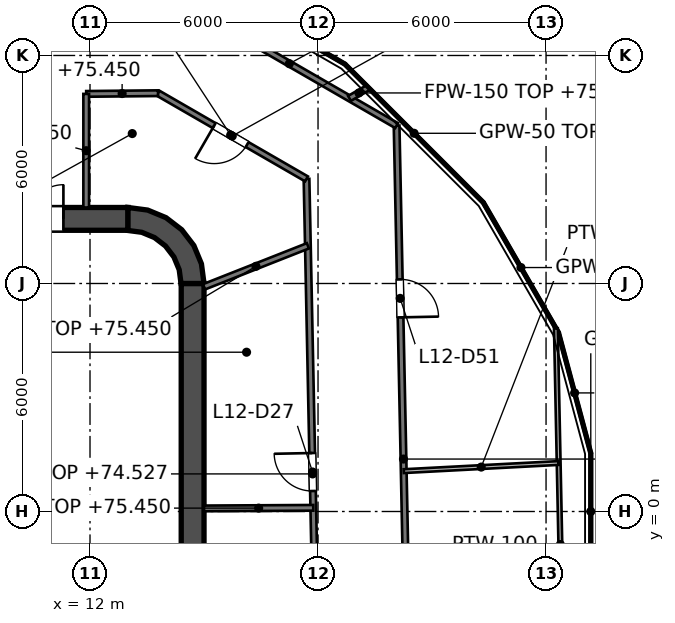
"""IFC4 building model, lengths in metres.
Left out: names, types, materials, properties, quantities, classifications, styles, units other than length and angle.
Written with IfcOpenShell. Run it as: python <this file> out.ifc"""

import sys

from ifc_helpers import new_model, si_unit, direction, frame, frame_2d, origin, place, context, subcontext, project, spatial, polyline, rectangle, outline, extrude, element, fill, save


model = new_model("IFC4")
c1 = context("Model", 3, precision=1e-05, world=origin(), true_north=direction((0.0, 1.0)))
c2 = subcontext(c1, "Body", "Model", "MODEL_VIEW")
j1 = project(units=[si_unit("LENGTHUNIT", "METRE"), si_unit("PLANEANGLEUNIT", "RADIAN")], contexts=[c1])
p1 = place(None, origin())
s1 = spatial("IfcSite", under=j1, at=p1, CompositionType="ELEMENT")
p2 = place(p1, origin())
s2 = spatial("IfcBuilding", under=s1, at=p2, CompositionType="ELEMENT")
p3 = place(p2, frame((0.0, 0.0, 71.4)))
s3 = spatial("IfcBuildingStorey", under=s2, at=p3, CompositionType="ELEMENT", Elevation=71.4)
p4 = place(p3, frame((-13.0, 7.7, 0.0), z_axis=(0.0, 0.0, 1.0), x_axis=(1.0, 0.0, 0.0)))
e1 = element("IfcWall", 1, at=p4, inside=s3, PredefinedType="SHEAR", context=c2, shape_type="SweptSolid", body=[
    extrude(rectangle(XDim=26.0, YDim=0.6, at=frame_2d((13.0, 0.0))), origin(), (0.0, 0.0, 1.0), 4.2),
])
p5 = place(p4, frame((1.7, 0.0, 0.0)))
e2 = element("IfcOpeningElement", 2, at=p5, cuts=e1, PredefinedType="OPENING", context=c2, shape_type="SweptSolid", body=[
    extrude(rectangle(XDim=1.8, YDim=2.1, at=frame_2d((0.9, 1.05))), frame((0.0, 0.3, 0.0), z_axis=(0.0, -1.0, 0.0), x_axis=(1.0, 0.0, 0.0)), (0.0, 0.0, 1.0), 0.6),
])
p6 = place(p4, frame((22.5, 0.0, 0.0)))
e3 = element("IfcOpeningElement", 3, at=p6, cuts=e1, PredefinedType="OPENING", context=c2, shape_type="SweptSolid", body=[
    extrude(rectangle(XDim=1.8, YDim=2.1, at=frame_2d((0.9, 1.05))), frame((0.0, 0.3, 0.0), z_axis=(0.0, -1.0, 0.0), x_axis=(1.0, 0.0, 0.0)), (0.0, 0.0, 1.0), 0.6),
])
p7 = place(p3, frame((14.7, -6.0, 0.0), z_axis=(0.0, 0.0, 1.0), x_axis=(0.0, 1.0, 0.0)))
e4 = element("IfcWall", 4, at=p7, inside=s3, PredefinedType="SHEAR", context=c2, shape_type="SweptSolid", body=[
    extrude(rectangle(XDim=12.0, YDim=0.6, at=frame_2d((6.0, 0.0))), origin(), (0.0, 0.0, 1.0), 4.2),
])
p8 = place(p3, origin())
e5 = element("IfcWall", 5, at=p8, inside=s3, PredefinedType="SHEAR", context=c2, shape_type="SweptSolid", body=[
    extrude(outline(polyline([(13.0, 8.0), (13.0, 7.395), (13.361, 7.347), (13.698, 7.208), (13.986, 6.986), (14.208, 6.698), (14.347, 6.361), (14.395, 6.0), (15.0, 6.0), (14.932, 6.518), (14.732, 7.0), (14.414, 7.414), (14.0, 7.732), (13.518, 7.932), (13.0, 8.0)])), origin(), (0.0, 0.0, 1.0), 4.2),
])
p9 = place(p3, frame((11.8, -7.4, 0.0), z_axis=(0.0, 0.0, 1.0), x_axis=(0.0, 1.0, 0.0)))
e6 = element("IfcWall", 6, at=p9, inside=s3, PredefinedType="SOLIDWALL", context=c2, shape_type="SweptSolid", body=[
    extrude(rectangle(XDim=14.8, YDim=0.4, at=frame_2d((7.4, 0.0))), origin(), (0.0, 0.0, 1.0), 4.05),
])
p10 = place(p9, frame((11.2, 0.0, 0.0)))
e7 = element("IfcOpeningElement", 7, at=p10, cuts=e6, PredefinedType="OPENING", context=c2, shape_type="SweptSolid", body=[
    extrude(rectangle(XDim=1.1, YDim=2.1, at=frame_2d((0.55, 1.05))), frame((0.0, 0.2, 0.0), z_axis=(0.0, -1.0, 0.0), x_axis=(1.0, 0.0, 0.0)), (0.0, 0.0, 1.0), 0.4),
])
p11 = place(p9, frame((8.3, 0.0, 0.0)))
e8 = element("IfcOpeningElement", 8, at=p11, cuts=e6, PredefinedType="OPENING", context=c2, shape_type="SweptSolid", body=[
    extrude(rectangle(XDim=1.1, YDim=2.1, at=frame_2d((0.55, 1.05))), frame((0.0, 0.2, 0.0), z_axis=(0.0, -1.0, 0.0), x_axis=(1.0, 0.0, 0.0)), (0.0, 0.0, 1.0), 0.4),
])
p12 = place(p9, frame((5.4, 0.0, 0.0)))
e9 = element("IfcOpeningElement", 9, at=p12, cuts=e6, PredefinedType="OPENING", context=c2, shape_type="SweptSolid", body=[
    extrude(rectangle(XDim=1.1, YDim=2.1, at=frame_2d((0.55, 1.05))), frame((0.0, 0.2, 0.0), z_axis=(0.0, -1.0, 0.0), x_axis=(1.0, 0.0, 0.0)), (0.0, 0.0, 1.0), 0.4),
])
p13 = place(p9, frame((13.552, 0.0, 0.0)))
e10 = element("IfcOpeningElement", 10, at=p13, cuts=e6, PredefinedType="OPENING", context=c2, shape_type="SweptSolid", body=[
    extrude(rectangle(XDim=0.9, YDim=2.1, at=frame_2d((0.45, 1.05))), frame((0.0, 0.2, 0.0), z_axis=(0.0, -1.0, 0.0), x_axis=(1.0, 0.0, 0.0)), (0.0, 0.0, 1.0), 0.4),
])
p14 = place(p9, frame((0.347, 0.0, 0.0)))
e11 = element("IfcOpeningElement", 11, at=p14, cuts=e6, PredefinedType="OPENING", context=c2, shape_type="SweptSolid", body=[
    extrude(rectangle(XDim=0.9, YDim=2.1, at=frame_2d((0.45, 1.05))), frame((0.0, 0.2, 0.0), z_axis=(0.0, -1.0, 0.0), x_axis=(1.0, 0.0, 0.0)), (0.0, 0.0, 1.0), 0.4),
])
e12 = element("IfcWall", 12, at=p8, inside=s3, PredefinedType="SOLIDWALL", context=c2, shape_type="SweptSolid", body=[
    extrude(outline(polyline([(12.0, -5.675), (12.0, -5.925), (14.15, -5.925), (14.4, -5.925), (14.4, -5.675), (14.4, -3.025), (14.4, -2.775), (14.4, -0.125), (14.4, 0.125), (14.4, 2.775), (14.4, 3.025), (14.4, 5.675), (14.4, 5.925), (14.15, 5.925), (12.0, 5.925), (12.0, 5.675), (14.15, 5.675), (14.15, 3.025), (12.0, 3.025), (12.0, 2.775), (14.15, 2.775), (14.15, 0.125), (12.0, 0.125), (12.0, -0.125), (14.15, -0.125), (14.15, -2.775), (12.0, -2.775), (12.0, -3.025), (14.15, -3.025), (14.15, -5.675), (12.0, -5.675)])), origin(), (0.0, 0.0, 1.0), 4.05),
])
p15 = place(p3, frame((17.697, 8.753, 0.0), z_axis=(0.0, 0.0, 1.0), x_axis=(0.020608181841, -0.99978762887, 0.0)))
e13 = element("IfcWall", 13, at=p15, inside=s3, PredefinedType="PARTITIONING", context=c2, shape_type="SweptSolid", body=[
    extrude(rectangle(XDim=15.531, YDim=0.15, at=frame_2d((7.766, 0.0))), origin(), (0.0, 0.0, 1.0), 3.127),
])
p16 = place(p15, frame((11.596, 0.0, 0.0)))
e14 = element("IfcOpeningElement", 14, at=p16, cuts=e13, PredefinedType="OPENING", context=c2, shape_type="SweptSolid", body=[
    extrude(rectangle(XDim=1.0, YDim=2.1, at=frame_2d((0.5, 1.05))), frame((0.0, 0.075, 0.0), z_axis=(0.0, -1.0, 0.0), x_axis=(1.0, 0.0, 0.0)), (0.0, 0.0, 1.0), 0.15),
])
p17 = place(p15, frame((7.216, 0.0, 0.0)))
e15 = element("IfcOpeningElement", 15, at=p17, cuts=e13, PredefinedType="OPENING", context=c2, shape_type="SweptSolid", body=[
    extrude(rectangle(XDim=1.0, YDim=2.1, at=frame_2d((0.5, 1.05))), frame((0.0, 0.075, 0.0), z_axis=(0.0, -1.0, 0.0), x_axis=(1.0, 0.0, 0.0)), (0.0, 0.0, 1.0), 0.15),
])
p18 = place(p3, frame((20.067, 10.155, 0.0), z_axis=(0.0, 0.0, 1.0), x_axis=(0.020611882214, -0.999787552589, 0.0)))
e16 = element("IfcWall", 16, at=p18, inside=s3, PredefinedType="PARTITIONING", context=c2, shape_type="SweptSolid", body=[
    extrude(rectangle(XDim=17.554, YDim=0.15, at=frame_2d((8.777, 0.0))), origin(), (0.0, 0.0, 1.0), 3.127),
])
p19 = place(p18, frame((11.808, 0.0, 0.0)))
e17 = element("IfcOpeningElement", 17, at=p19, cuts=e16, PredefinedType="OPENING", context=c2, shape_type="SweptSolid", body=[
    extrude(rectangle(XDim=1.0, YDim=2.1, at=frame_2d((0.5, 1.05))), frame((0.0, 0.075, 0.0), z_axis=(0.0, -1.0, 0.0), x_axis=(1.0, 0.0, 0.0)), (0.0, 0.0, 1.0), 0.15),
])
p20 = place(p18, frame((4.048, 0.0, 0.0)))
e18 = element("IfcOpeningElement", 18, at=p20, cuts=e16, PredefinedType="OPENING", context=c2, shape_type="SweptSolid", body=[
    extrude(rectangle(XDim=1.0, YDim=2.1, at=frame_2d((0.5, 1.05))), frame((0.0, 0.075, 0.0), z_axis=(0.0, -1.0, 0.0), x_axis=(1.0, 0.0, 0.0)), (0.0, 0.0, 1.0), 0.15),
])
p21 = place(p3, frame((13.79, 11.008, 0.0), z_axis=(0.0, 0.0, 1.0), x_axis=(0.866043190618, -0.499969191034, 0.0)))
e19 = element("IfcWall", 19, at=p21, inside=s3, PredefinedType="PARTITIONING", context=c2, shape_type="SweptSolid", body=[
    extrude(rectangle(XDim=4.511, YDim=0.15, at=frame_2d((2.255, 0.0))), origin(), (0.0, 0.0, 1.0), 3.195),
])
p22 = place(p21, frame((1.706, 0.0, 0.0)))
e20 = element("IfcOpeningElement", 20, at=p22, cuts=e19, PredefinedType="OPENING", context=c2, shape_type="SweptSolid", body=[
    extrude(rectangle(XDim=1.0, YDim=2.1, at=frame_2d((0.5, 1.05))), frame((0.0, 0.075, 0.0), z_axis=(0.0, -1.0, 0.0), x_axis=(1.0, 0.0, 0.0)), (0.0, 0.0, 1.0), 0.15),
])
p23 = place(p3, frame((14.422, 13.414, 0.0), z_axis=(0.0, 0.0, 1.0), x_axis=(0.866054628924, -0.499949377157, 0.0)))
e21 = element("IfcWall", 21, at=p23, inside=s3, PredefinedType="PARTITIONING", context=c2, shape_type="SweptSolid", body=[
    extrude(rectangle(XDim=6.519, YDim=0.15, at=frame_2d((3.26, 0.0))), origin(), (0.0, 0.0, 1.0), 3.195),
])
p24 = place(p23, frame((0.701, 0.0, 0.0)))
e22 = element("IfcOpeningElement", 22, at=p24, cuts=e21, PredefinedType="OPENING", context=c2, shape_type="SweptSolid", body=[
    extrude(rectangle(XDim=1.0, YDim=2.1, at=frame_2d((0.5, 1.05))), frame((0.0, 0.075, 0.0), z_axis=(0.0, -1.0, 0.0), x_axis=(1.0, 0.0, 0.0)), (0.0, 0.0, 1.0), 0.15),
])
p25 = place(p3, frame((15.0, 0.081, 0.0), z_axis=(0.0, 0.0, 1.0), x_axis=(0.999985231896, 0.005434702347, 0.0)))
e23 = element("IfcWall", 23, at=p25, inside=s3, PredefinedType="PARTITIONING", context=c2, shape_type="SweptSolid", body=[
    extrude(rectangle(XDim=2.875, YDim=0.15, at=frame_2d((1.438, 0.0))), origin(), (0.0, 0.0, 1.0), 4.05),
])
p26 = place(p3, frame((11.9, 10.989, 0.0), z_axis=(0.0, 0.0, 1.0), x_axis=(0.999950544693, 0.009945258582, 0.0)))
e24 = element("IfcWall", 24, at=p26, inside=s3, PredefinedType="PARTITIONING", context=c2, shape_type="SweptSolid", body=[
    extrude(rectangle(XDim=1.89, YDim=0.15, at=frame_2d((0.945, 0.0))), origin(), (0.0, 0.0, 1.0), 4.05),
])
p27 = place(p3, frame((15.0, 5.913, 0.0), z_axis=(0.0, 0.0, 1.0), x_axis=(0.930259747539, 0.366901624565, 0.0)))
e25 = element("IfcWall", 25, at=p27, inside=s3, PredefinedType="PARTITIONING", context=c2, shape_type="SweptSolid", body=[
    extrude(rectangle(XDim=2.938, YDim=0.15, at=frame_2d((1.469, 0.0))), origin(), (0.0, 0.0, 1.0), 4.05),
])
p28 = place(p3, frame((18.828, 10.871, 0.0), z_axis=(0.0, 0.0, 1.0), x_axis=(0.866242357422, 0.49962403686, 0.0)))
e26 = element("IfcWall", 26, at=p28, inside=s3, PredefinedType="PARTITIONING", context=c2, shape_type="SweptSolid", body=[
    extrude(rectangle(XDim=0.573, YDim=0.15, at=frame_2d((0.286, 0.0))), origin(), (0.0, 0.0, 1.0), 4.05),
])
p29 = place(p3, frame((11.9, 8.0, 0.0), z_axis=(0.0, 0.0, 1.0), x_axis=(0.0, 1.0, 0.0)))
e27 = element("IfcWall", 27, at=p29, inside=s3, PredefinedType="PARTITIONING", context=c2, shape_type="SweptSolid", body=[
    extrude(rectangle(XDim=2.989, YDim=0.15, at=frame_2d((1.495, 0.0))), origin(), (0.0, 0.0, 1.0), 3.195),
])
p30 = place(p3, frame((24.327, 4.706, 0.0), z_axis=(0.0, 0.0, 1.0), x_axis=(0.258930604243, -0.965895927202, 0.0)))
e28 = element("IfcWall", 28, at=p30, inside=s3, PredefinedType="PARTITIONING", context=c2, shape_type="SweptSolid", body=[
    extrude(rectangle(XDim=3.283, YDim=0.05, at=frame_2d((1.642, 0.0))), origin(), (0.0, 0.0, 1.0), 3.127),
])
p31 = place(p3, frame((22.349, 8.132, 0.0), z_axis=(0.0, 0.0, 1.0), x_axis=(0.500744318686, -0.865595244502, 0.0)))
e29 = element("IfcWall", 29, at=p31, inside=s3, PredefinedType="PARTITIONING", context=c2, shape_type="SweptSolid", body=[
    extrude(rectangle(XDim=3.956, YDim=0.05, at=frame_2d((1.978, 0.0))), origin(), (0.0, 0.0, 1.0), 3.127),
])
p32 = place(p3, frame((18.708, 11.773, 0.0), z_axis=(0.0, 0.0, 1.0), x_axis=(0.707130487725, -0.707083073853, 0.0)))
e30 = element("IfcWall", 30, at=p32, inside=s3, PredefinedType="PARTITIONING", context=c2, shape_type="SweptSolid", body=[
    extrude(rectangle(XDim=5.149, YDim=0.05, at=frame_2d((2.575, 0.0))), origin(), (0.0, 0.0, 1.0), 3.195),
])
p33 = place(p3, frame((17.134, 12.682, 0.0), z_axis=(0.0, 0.0, 1.0), x_axis=(0.865977542148, -0.500082889625, 0.0)))
e31 = element("IfcWall", 31, at=p33, inside=s3, PredefinedType="PARTITIONING", context=c2, shape_type="SweptSolid", body=[
    extrude(rectangle(XDim=1.818, YDim=0.05, at=frame_2d((0.909, 0.0))), origin(), (0.0, 0.0, 1.0), 3.195),
])
p34 = place(p3, frame((25.177, -1.535, 0.0), z_axis=(0.0, 0.0, 1.0), x_axis=(0.0, 1.0, 0.0)))
e32 = element("IfcWall", 32, at=p34, inside=s3, PredefinedType="PARTITIONING", context=c2, shape_type="SweptSolid", body=[
    extrude(rectangle(XDim=3.07, YDim=0.05, at=frame_2d((1.535, 0.0))), origin(), (0.0, 0.0, 1.0), 4.05),
])
p35 = place(p3, frame((24.259, 4.823, 0.0), z_axis=(0.0, 0.0, 1.0), x_axis=(0.020601583336, -0.99978776486, 0.0)))
e33 = element("IfcWall", 33, at=p35, inside=s3, PredefinedType="PARTITIONING", context=c2, shape_type="SweptSolid", body=[
    extrude(rectangle(XDim=11.388, YDim=0.1, at=frame_2d((5.694, 0.0))), origin(), (0.0, 0.0, 1.0), 3.127),
])
p36 = place(p35, frame((7.769, 0.0, 0.0)))
e34 = element("IfcOpeningElement", 34, at=p36, cuts=e33, PredefinedType="OPENING", context=c2, shape_type="SweptSolid", body=[
    extrude(rectangle(XDim=0.9, YDim=2.1, at=frame_2d((0.45, 1.05))), frame((0.0, 0.05, 0.0), z_axis=(0.0, -1.0, 0.0), x_axis=(1.0, 0.0, 0.0)), (0.0, 0.0, 1.0), 0.1),
])
p37 = place(p3, frame((20.256, 1.062, 0.0), z_axis=(0.0, 0.0, 1.0), x_axis=(0.998626243597, 0.052398717544, 0.0)))
e35 = element("IfcWall", 35, at=p37, inside=s3, PredefinedType="PARTITIONING", context=c2, shape_type="SweptSolid", body=[
    extrude(rectangle(XDim=4.082, YDim=0.1, at=frame_2d((2.041, 0.0))), origin(), (0.0, 0.0, 1.0), 4.05),
])
p38 = place(p10, origin())
e36 = element("IfcDoor", 36, at=p38, inside=s3, OperationType="DOUBLE_DOOR_SLIDING", PredefinedType="DOOR", context=c2, shape_type="SweptSolid", body=[
    extrude(rectangle(XDim=1.1, YDim=2.1, at=frame_2d((0.55, 1.05))), frame((0.0, 0.025, 0.0), z_axis=(0.0, -1.0, 0.0), x_axis=(1.0, 0.0, 0.0)), (0.0, 0.0, 1.0), 0.05),
])
fill(e7, e36)
p39 = place(p11, origin())
e37 = element("IfcDoor", 37, at=p39, inside=s3, OperationType="DOUBLE_DOOR_SLIDING", PredefinedType="DOOR", context=c2, shape_type="SweptSolid", body=[
    extrude(rectangle(XDim=1.1, YDim=2.1, at=frame_2d((0.55, 1.05))), frame((0.0, 0.025, 0.0), z_axis=(0.0, -1.0, 0.0), x_axis=(1.0, 0.0, 0.0)), (0.0, 0.0, 1.0), 0.05),
])
fill(e8, e37)
p40 = place(p13, origin())
e38 = element("IfcDoor", 38, at=p40, inside=s3, OperationType="SINGLE_SWING_RIGHT", PredefinedType="DOOR", context=c2, shape_type="SweptSolid", body=[
    extrude(rectangle(XDim=0.9, YDim=2.1, at=frame_2d((0.45, 1.05))), frame((0.0, 0.025, 0.0), z_axis=(0.0, -1.0, 0.0), x_axis=(1.0, 0.0, 0.0)), (0.0, 0.0, 1.0), 0.05),
])
fill(e10, e38)
p41 = place(p6, origin())
e39 = element("IfcDoor", 39, at=p41, inside=s3, OperationType="DOUBLE_DOOR_SINGLE_SWING", PredefinedType="DOOR", context=c2, shape_type="SweptSolid", body=[
    extrude(rectangle(XDim=1.8, YDim=2.1, at=frame_2d((0.9, 1.05))), frame((0.0, 0.025, 0.0), z_axis=(0.0, -1.0, 0.0), x_axis=(1.0, 0.0, 0.0)), (0.0, 0.0, 1.0), 0.05),
])
fill(e3, e39)
p42 = place(p17, origin())
e40 = element("IfcDoor", 40, at=p42, inside=s3, OperationType="SINGLE_SWING_LEFT", PredefinedType="DOOR", context=c2, shape_type="SweptSolid", body=[
    extrude(rectangle(XDim=1.0, YDim=2.1, at=frame_2d((0.5, 1.05))), frame((0.0, 0.025, 0.0), z_axis=(0.0, -1.0, 0.0), x_axis=(1.0, 0.0, 0.0)), (0.0, 0.0, 1.0), 0.05),
])
fill(e15, e40)
p43 = place(p22, origin())
e41 = element("IfcDoor", 41, at=p43, inside=s3, OperationType="SINGLE_SWING_LEFT", PredefinedType="DOOR", context=c2, shape_type="SweptSolid", body=[
    extrude(rectangle(XDim=1.0, YDim=2.1, at=frame_2d((0.5, 1.05))), frame((0.0, 0.025, 0.0), z_axis=(0.0, -1.0, 0.0), x_axis=(1.0, 0.0, 0.0)), (0.0, 0.0, 1.0), 0.05),
])
fill(e20, e41)
p44 = place(p20, origin())
e42 = element("IfcDoor", 42, at=p44, inside=s3, OperationType="SINGLE_SWING_RIGHT", PredefinedType="DOOR", context=c2, shape_type="SweptSolid", body=[
    extrude(rectangle(XDim=1.0, YDim=2.1, at=frame_2d((0.5, 1.05))), frame((0.0, 0.025, 0.0), z_axis=(0.0, -1.0, 0.0), x_axis=(1.0, 0.0, 0.0)), (0.0, 0.0, 1.0), 0.05),
])
fill(e18, e42)
save(model, sys.argv[1])
